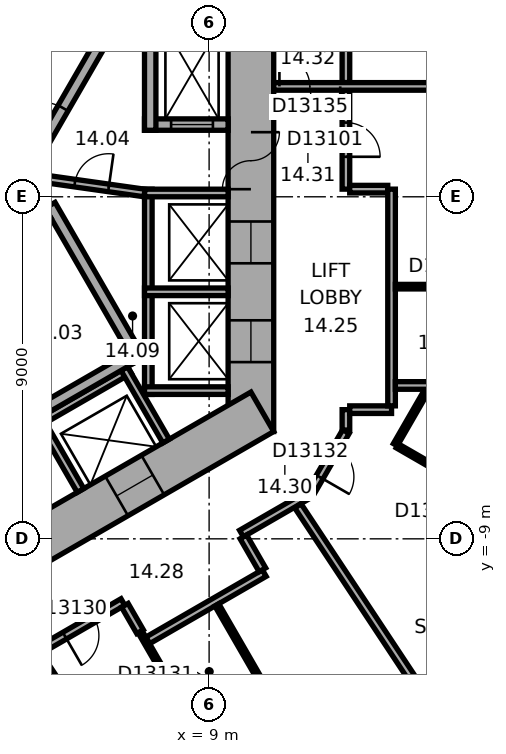
"""IFC4 building model, lengths in metres.
Left out: names, types, materials, properties, quantities, classifications, styles, units other than length and angle.
Written with IfcOpenShell. Run it as: python <this file> out.ifc"""

import sys

from ifc_helpers import new_model, si_unit, direction, frame, frame_2d, origin, place, context, subcontext, project, spatial, rectangle, extrude, element, fill, save


model = new_model("IFC4")
c1 = context("Model", 3, precision=1e-05, world=origin(), true_north=direction((0.0, 1.0)))
c2 = subcontext(c1, "Body", "Model", "MODEL_VIEW")
j1 = project(units=[si_unit("LENGTHUNIT", "METRE"), si_unit("PLANEANGLEUNIT", "RADIAN")], contexts=[c1])
p1 = place(None, origin())
s1 = spatial("IfcSite", under=j1, at=p1, CompositionType="ELEMENT")
p2 = place(p1, origin())
s2 = spatial("IfcBuilding", under=s1, at=p2, CompositionType="ELEMENT")
p3 = place(p2, frame((0.0, 0.0, 67.1)))
s3 = spatial("IfcBuildingStorey", under=s2, at=p3, CompositionType="ELEMENT", Elevation=67.1)
p4 = place(p3, frame((10.1, -6.177, 0.0), z_axis=(0.0, 0.0, 1.0), x_axis=(0.0, 1.0, 0.0)))
e1 = element("IfcWall", 1, at=p4, inside=s3, PredefinedType="SHEAR", context=c2, shape_type="SweptSolid", body=[
    extrude(rectangle(XDim=12.355, YDim=1.2, at=frame_2d((6.177, 0.0))), origin(), (0.0, 0.0, 1.0), 3.3),
])
p5 = place(p4, frame((6.378, 0.0, 0.0)))
e2 = element("IfcOpeningElement", 2, at=p5, cuts=e1, PredefinedType="OPENING", context=c2, shape_type="SweptSolid", body=[
    extrude(rectangle(XDim=1.5, YDim=2.1, at=frame_2d((0.75, 1.05))), frame((0.0, 0.61, 0.0), z_axis=(0.0, -1.0, 0.0), x_axis=(1.0, 0.0, 0.0)), (0.0, 0.0, 1.0), 1.22),
])
p6 = place(p4, frame((1.828, 0.0, 0.0)))
e3 = element("IfcOpeningElement", 3, at=p6, cuts=e1, PredefinedType="OPENING", context=c2, shape_type="SweptSolid", body=[
    extrude(rectangle(XDim=1.1, YDim=2.1, at=frame_2d((0.55, 1.05))), frame((0.0, 0.61, 0.0), z_axis=(0.0, -1.0, 0.0), x_axis=(1.0, 0.0, 0.0)), (0.0, 0.0, 1.0), 1.22),
])
p7 = place(p4, frame((4.427, 0.0, 0.0)))
e4 = element("IfcOpeningElement", 4, at=p7, cuts=e1, PredefinedType="OPENING", context=c2, shape_type="SweptSolid", body=[
    extrude(rectangle(XDim=1.1, YDim=2.1, at=frame_2d((0.55, 1.05))), frame((0.0, 0.61, 0.0), z_axis=(0.0, -1.0, 0.0), x_axis=(1.0, 0.0, 0.0)), (0.0, 0.0, 1.0), 1.22),
])
p8 = place(p3, frame((-0.3, -11.836, 0.0), z_axis=(0.0, 0.0, 1.0), x_axis=(0.866021384402, 0.500006961711, 0.0)))
e5 = element("IfcWall", 5, at=p8, inside=s3, PredefinedType="SHEAR", context=c2, shape_type="SweptSolid", body=[
    extrude(rectangle(XDim=12.355, YDim=1.2, at=frame_2d((6.178, 0.0))), origin(), (0.0, 0.0, 1.0), 3.3),
])
p9 = place(p8, frame((4.128, 0.0, 0.0)))
e6 = element("IfcOpeningElement", 6, at=p9, cuts=e5, PredefinedType="OPENING", context=c2, shape_type="SweptSolid", body=[
    extrude(rectangle(XDim=0.9, YDim=2.1, at=frame_2d((0.45, 1.05))), frame((0.0, 0.61, 0.0), z_axis=(0.0, -1.0, 0.0), x_axis=(1.0, 0.0, 0.0)), (0.0, 0.0, 1.0), 1.22),
])
p10 = place(p8, frame((7.928, 0.0, 0.0)))
e7 = element("IfcOpeningElement", 7, at=p10, cuts=e5, PredefinedType="OPENING", context=c2, shape_type="SweptSolid", body=[
    extrude(rectangle(XDim=1.1, YDim=2.1, at=frame_2d((0.55, 1.05))), frame((0.0, 0.61, 0.0), z_axis=(0.0, -1.0, 0.0), x_axis=(1.0, 0.0, 0.0)), (0.0, 0.0, 1.0), 1.22),
])
p11 = place(p3, frame((7.4, -5.2, 0.0), z_axis=(0.0, 0.0, 1.0), x_axis=(0.0, 1.0, 0.0)))
e8 = element("IfcWall", 8, at=p11, inside=s3, PredefinedType="PARTITIONING", context=c2, shape_type="SweptSolid", body=[
    extrude(rectangle(XDim=5.4, YDim=0.2, at=frame_2d((2.7, 0.0))), origin(), (0.0, 0.0, 1.0), 3.05),
])
for number, where, z_axis, x_axis in (
    (9, (7.3, -5.1, 0.0), (0.0, 0.0, 1.0), (1.0, 0.0, 0.0)),
    (10, (7.3, -2.5, 0.0), (0.0, 0.0, 1.0), (1.0, 0.0, 0.0)),
    (11, (7.3, 0.1, 0.0), (0.0, 0.0, 1.0), (1.0, 0.0, 0.0)),
):
    element("IfcWall", number, at=place(p3, frame(where, z_axis=z_axis, x_axis=x_axis)), inside=s3, PredefinedType="PARTITIONING", context=c2, shape_type="SweptSolid", body=[
        extrude(rectangle(XDim=2.2, YDim=0.2, at=frame_2d((1.1, 0.0))), origin(), (0.0, 0.0, 1.0), 3.05),
    ])
p12 = place(p3, frame((-0.024, -8.559, 0.0), z_axis=(0.0, 0.0, 1.0), x_axis=(0.866026010844, 0.49999894854, 0.0)))
e12 = element("IfcWall", 12, at=p12, inside=s3, PredefinedType="PARTITIONING", context=c2, shape_type="SweptSolid", body=[
    extrude(rectangle(XDim=8.0, YDim=0.2, at=frame_2d((4.0, 0.0))), origin(), (0.0, 0.0, 1.0), 3.05),
])
for number, where, z_axis, x_axis in (
    (13, (4.516, -5.822, 0.0), (0.0, 0.0, 1.0), (0.5, -0.866, 0.0)),
    (14, (6.768, -4.522, 0.0), (0.0, 0.0, 1.0), (0.5, -0.866, 0.0)),
):
    element("IfcWall", number, at=place(p3, frame(where, z_axis=z_axis, x_axis=x_axis)), inside=s3, PredefinedType="PARTITIONING", context=c2, shape_type="SweptSolid", body=[
        extrude(rectangle(XDim=2.2, YDim=0.2, at=frame_2d((1.1, 0.0))), origin(), (0.0, 0.0, 1.0), 3.05),
    ])
p13 = place(p3, frame((4.158, 0.602, 0.0), z_axis=(0.0, 0.0, 1.0), x_axis=(0.499977259774, 0.866038532462, 0.0)))
e15 = element("IfcWall", 15, at=p13, inside=s3, PredefinedType="SHEAR", context=c2, shape_type="SweptSolid", body=[
    extrude(rectangle(XDim=4.7, YDim=0.3, at=frame_2d((2.35, 0.0))), origin(), (0.0, 0.0, 1.0), 3.05),
])
p14 = place(p13, frame((0.8, 0.0, 0.0)))
e16 = element("IfcOpeningElement", 16, at=p14, cuts=e15, PredefinedType="OPENING", context=c2, shape_type="SweptSolid", body=[
    extrude(rectangle(XDim=1.2, YDim=2.1, at=frame_2d((0.6, 1.05))), frame((0.0, 0.16, 0.0), z_axis=(0.0, -1.0, 0.0), x_axis=(1.0, 0.0, 0.0)), (0.0, 0.0, 1.0), 0.32),
])
p15 = place(p3, frame((4.816, -0.222, 0.0), z_axis=(0.0, 0.0, 1.0), x_axis=(0.499977259774, -0.866038532462, 0.0)))
e17 = element("IfcWall", 17, at=p15, inside=s3, PredefinedType="SHEAR", context=c2, shape_type="SweptSolid", body=[
    extrude(rectangle(XDim=4.7, YDim=0.3, at=frame_2d((2.35, 0.0))), origin(), (0.0, 0.0, 1.0), 3.05),
])
p16 = place(p3, frame((0.847, -7.767, 0.0), z_axis=(0.0, 0.0, 1.0), x_axis=(0.866027801685, 0.499995846692, 0.0)))
e18 = element("IfcWall", 18, at=p16, inside=s3, PredefinedType="SHEAR", context=c2, shape_type="SweptSolid", body=[
    extrude(rectangle(XDim=7.06, YDim=0.3, at=frame_2d((3.53, 0.0))), origin(), (0.0, 0.0, 1.0), 3.05),
])
p17 = place(p3, frame((7.3, 1.9, 0.0), z_axis=(0.0, 0.0, 1.0), x_axis=(1.0, 0.0, 0.0)))
e19 = element("IfcWall", 19, at=p17, inside=s3, PredefinedType="SHEAR", context=c2, shape_type="SweptSolid", body=[
    extrude(rectangle(XDim=2.2, YDim=0.3, at=frame_2d((1.1, 0.0))), origin(), (0.0, 0.0, 1.0), 3.05),
])
p18 = place(p17, frame((0.7, 0.0, 0.0)))
e20 = element("IfcOpeningElement", 20, at=p18, cuts=e19, PredefinedType="OPENING", context=c2, shape_type="SweptSolid", body=[
    extrude(rectangle(XDim=1.1, YDim=2.1, at=frame_2d((0.55, 1.05))), frame((0.0, 0.16, 0.0), z_axis=(0.0, -1.0, 0.0), x_axis=(1.0, 0.0, 0.0)), (0.0, 0.0, 1.0), 0.32),
])
p19 = place(p3, frame((7.45, 1.75, 0.0), z_axis=(0.0, 0.0, 1.0), x_axis=(0.0, 1.0, 0.0)))
e21 = element("IfcWall", 21, at=p19, inside=s3, PredefinedType="SHEAR", context=c2, shape_type="SweptSolid", body=[
    extrude(rectangle(XDim=3.35, YDim=0.3, at=frame_2d((1.675, 0.0))), origin(), (0.0, 0.0, 1.0), 3.05),
])
p20 = place(p3, frame((4.327, 0.521, 0.0), z_axis=(0.0, 0.0, 1.0), x_axis=(0.990124376366, -0.14019172346, 0.0)))
e22 = element("IfcWall", 22, at=p20, inside=s3, PredefinedType="PARTITIONING", context=c2, shape_type="SweptSolid", body=[
    extrude(rectangle(XDim=3.002, YDim=0.2, at=frame_2d((1.501, 0.0))), origin(), (0.0, 0.0, 1.0), 3.05),
])
p21 = place(p20, frame((1.15, 0.0, 0.0)))
e23 = element("IfcOpeningElement", 23, at=p21, cuts=e22, PredefinedType="OPENING", context=c2, shape_type="SweptSolid", body=[
    extrude(rectangle(XDim=0.9, YDim=2.1, at=frame_2d((0.45, 1.05))), frame((0.0, 0.11, 0.0), z_axis=(0.0, -1.0, 0.0), x_axis=(1.0, 0.0, 0.0)), (0.0, 0.0, 1.0), 0.22),
])
p22 = place(p3, frame((1.033, -13.953, 0.0), z_axis=(0.0, 0.0, 1.0), x_axis=(0.866017531406, 0.500013635111, 0.0)))
e24 = element("IfcWall", 24, at=p22, inside=s3, PredefinedType="PARTITIONING", context=c2, shape_type="SweptSolid", body=[
    extrude(rectangle(XDim=6.58, YDim=0.2, at=frame_2d((3.29, 0.0))), origin(), (0.0, 0.0, 1.0), 3.05),
])
p23 = place(p22, frame((0.496, 0.0, 0.0)))
e25 = element("IfcOpeningElement", 25, at=p23, cuts=e24, PredefinedType="OPENING", context=c2, shape_type="SweptSolid", body=[
    extrude(rectangle(XDim=0.9, YDim=2.1, at=frame_2d((0.45, 1.05))), frame((0.0, 0.11, 0.0), z_axis=(0.0, -1.0, 0.0), x_axis=(1.0, 0.0, 0.0)), (0.0, 0.0, 1.0), 0.22),
])
p24 = place(p22, frame((4.811, 0.0, 0.0)))
e26 = element("IfcOpeningElement", 26, at=p24, cuts=e24, PredefinedType="OPENING", context=c2, shape_type="SweptSolid", body=[
    extrude(rectangle(XDim=0.9, YDim=2.1, at=frame_2d((0.45, 1.05))), frame((0.0, 0.11, 0.0), z_axis=(0.0, -1.0, 0.0), x_axis=(1.0, 0.0, 0.0)), (0.0, 0.0, 1.0), 0.22),
])
p25 = place(p3, frame((6.782, -10.749, 0.0), z_axis=(0.0, 0.0, 1.0), x_axis=(0.500170954823, -0.865926680471, 0.0)))
e27 = element("IfcWall", 27, at=p25, inside=s3, PredefinedType="PARTITIONING", context=c2, shape_type="SweptSolid", body=[
    extrude(rectangle(XDim=0.801, YDim=0.2, at=frame_2d((0.4, 0.0))), origin(), (0.0, 0.0, 1.0), 3.05),
])
p26 = place(p3, frame((7.385, -11.673, 0.0), z_axis=(0.0, 0.0, 1.0), x_axis=(0.866037524642, 0.499979005472, 0.0)))
e28 = element("IfcWall", 28, at=p26, inside=s3, PredefinedType="PARTITIONING", context=c2, shape_type="SweptSolid", body=[
    extrude(rectangle(XDim=3.542, YDim=0.2, at=frame_2d((1.771, 0.0))), origin(), (0.0, 0.0, 1.0), 3.05),
])
p27 = place(p3, frame((8.833, -14.301, 0.0), z_axis=(0.0, 0.0, 1.0), x_axis=(-0.499936836718, 0.866061868051, 0.0)))
e29 = element("IfcWall", 29, at=p27, inside=s3, PredefinedType="PARTITIONING", context=c2, shape_type="SweptSolid", body=[
    extrude(rectangle(XDim=3.188, YDim=0.12, at=frame_2d((1.594, 0.0))), origin(), (0.0, 0.0, 1.0), 3.05),
])
p28 = place(p27, frame((1.144, 0.0, 0.0)))
e30 = element("IfcOpeningElement", 30, at=p28, cuts=e29, PredefinedType="OPENING", context=c2, shape_type="SweptSolid", body=[
    extrude(rectangle(XDim=0.9, YDim=2.1, at=frame_2d((0.45, 1.05))), frame((0.0, 0.07, 0.0), z_axis=(0.0, -1.0, 0.0), x_axis=(1.0, 0.0, 0.0)), (0.0, 0.0, 1.0), 0.14),
])
p29 = place(p3, frame((9.203, -10.738, 0.0), z_axis=(0.0, 0.0, 1.0), x_axis=(0.50005036918, -0.865996321171, 0.0)))
e31 = element("IfcWall", 31, at=p29, inside=s3, PredefinedType="PARTITIONING", context=c2, shape_type="SweptSolid", body=[
    extrude(rectangle(XDim=2.9, YDim=0.12, at=frame_2d((1.45, 0.0))), origin(), (0.0, 0.0, 1.0), 3.05),
])
p30 = place(p3, frame((9.693, -19.907, 0.0), z_axis=(0.0, 0.0, 1.0), x_axis=(-0.551938394837, 0.833884889121, 0.0)))
e32 = element("IfcWall", 32, at=p30, inside=s3, PredefinedType="PARTITIONING", context=c2, shape_type="SweptSolid", body=[
    extrude(rectangle(XDim=9.394, YDim=0.2, at=frame_2d((4.697, 0.0))), origin(), (0.0, 0.0, 1.0), 2.6),
])
p31 = place(p3, frame((9.852, -8.861, 0.0), z_axis=(0.0, 0.0, 1.0), x_axis=(0.866013291437, 0.500020978615, 0.0)))
e33 = element("IfcWall", 33, at=p31, inside=s3, PredefinedType="PARTITIONING", context=c2, shape_type="SweptSolid", body=[
    extrude(rectangle(XDim=2.077, YDim=0.2, at=frame_2d((1.038, 0.0))), origin(), (0.0, 0.0, 1.0), 3.05),
])
p32 = place(p3, frame((10.402, -9.815, 0.0), z_axis=(0.0, 0.0, 1.0), x_axis=(-0.499968756647, 0.866043441391, 0.0)))
e34 = element("IfcWall", 34, at=p32, inside=s3, PredefinedType="PARTITIONING", context=c2, shape_type="SweptSolid", body=[
    extrude(rectangle(XDim=1.001, YDim=0.2, at=frame_2d((0.5, 0.0))), origin(), (0.0, 0.0, 1.0), 3.05),
])
p33 = place(p3, frame((11.67, -7.788, 0.0), z_axis=(0.0, 0.0, 1.0), x_axis=(0.500063286585, 0.865988862174, 0.0)))
e35 = element("IfcWall", 35, at=p33, inside=s3, PredefinedType="PARTITIONING", context=c2, shape_type="SweptSolid", body=[
    extrude(rectangle(XDim=1.86, YDim=0.2, at=frame_2d((0.93, 0.0))), origin(), (0.0, 0.0, 1.0), 3.05),
])
p34 = place(p33, frame((0.48, 0.0, 0.0)))
e36 = element("IfcOpeningElement", 36, at=p34, cuts=e35, PredefinedType="OPENING", context=c2, shape_type="SweptSolid", body=[
    extrude(rectangle(XDim=0.9, YDim=2.1, at=frame_2d((0.45, 1.05))), frame((0.0, 0.11, 0.0), z_axis=(0.0, -1.0, 0.0), x_axis=(1.0, 0.0, 0.0)), (0.0, 0.0, 1.0), 0.22),
])
p35 = place(p3, frame((12.6, -6.138, 0.0), z_axis=(0.0, 0.0, 1.0), x_axis=(0.0, 1.0, 0.0)))
e37 = element("IfcWall", 37, at=p35, inside=s3, PredefinedType="PARTITIONING", context=c2, shape_type="SweptSolid", body=[
    extrude(rectangle(XDim=0.537, YDim=0.2, at=frame_2d((0.268, 0.0))), origin(), (0.0, 0.0, 1.0), 3.05),
])
p36 = place(p3, frame((12.6, 0.201, 0.0), z_axis=(0.0, 0.0, 1.0), x_axis=(0.0, 1.0, 0.0)))
e38 = element("IfcWall", 38, at=p36, inside=s3, PredefinedType="PARTITIONING", context=c2, shape_type="SweptSolid", body=[
    extrude(rectangle(XDim=2.604, YDim=0.2, at=frame_2d((1.302, 0.0))), origin(), (0.0, 0.0, 1.0), 3.05),
])
p37 = place(p36, frame((0.852, 0.0, 0.0)))
e39 = element("IfcOpeningElement", 39, at=p37, cuts=e38, PredefinedType="OPENING", context=c2, shape_type="SweptSolid", body=[
    extrude(rectangle(XDim=0.9, YDim=2.1, at=frame_2d((0.45, 1.05))), frame((0.0, 0.11, 0.0), z_axis=(0.0, -1.0, 0.0), x_axis=(1.0, 0.0, 0.0)), (0.0, 0.0, 1.0), 0.22),
])
p38 = place(p3, frame((12.6, 3.004, 0.0), z_axis=(0.0, 0.0, 1.0), x_axis=(0.0, 1.0, 0.0)))
e40 = element("IfcWall", 40, at=p38, inside=s3, PredefinedType="PARTITIONING", context=c2, shape_type="SweptSolid", body=[
    extrude(rectangle(XDim=3.173, YDim=0.2, at=frame_2d((1.586, 0.0))), origin(), (0.0, 0.0, 1.0), 3.05),
])
p39 = place(p38, frame((1.136, 0.0, 0.0)))
e41 = element("IfcOpeningElement", 41, at=p39, cuts=e40, PredefinedType="OPENING", context=c2, shape_type="SweptSolid", body=[
    extrude(rectangle(XDim=0.9, YDim=2.1, at=frame_2d((0.45, 1.05))), frame((0.0, 0.11, 0.0), z_axis=(0.0, -1.0, 0.0), x_axis=(1.0, 0.0, 0.0)), (0.0, 0.0, 1.0), 0.22),
])
p40 = place(p3, frame((12.7, -5.601, 0.0), z_axis=(0.0, 0.0, 1.0), x_axis=(1.0, 0.0, 0.0)))
e42 = element("IfcWall", 42, at=p40, inside=s3, PredefinedType="PARTITIONING", context=c2, shape_type="SweptSolid", body=[
    extrude(rectangle(XDim=1.101, YDim=0.2, at=frame_2d((0.551, 0.0))), origin(), (0.0, 0.0, 1.0), 3.05),
])
p41 = place(p3, frame((13.701, 0.201, 0.0), z_axis=(0.0, 0.0, 1.0), x_axis=(-1.0, 0.0, 0.0)))
e43 = element("IfcWall", 43, at=p41, inside=s3, PredefinedType="PARTITIONING", context=c2, shape_type="SweptSolid", body=[
    extrude(rectangle(XDim=1.001, YDim=0.2, at=frame_2d((0.5, 0.0))), origin(), (0.0, 0.0, 1.0), 3.05),
])
p42 = place(p3, frame((13.801, -5.501, 0.0), z_axis=(0.0, 0.0, 1.0), x_axis=(0.0, 1.0, 0.0)))
e44 = element("IfcWall", 44, at=p42, inside=s3, PredefinedType="PARTITIONING", context=c2, shape_type="SweptSolid", body=[
    extrude(rectangle(XDim=5.702, YDim=0.2, at=frame_2d((2.851, 0.0))), origin(), (0.0, 0.0, 1.0), 3.05),
])
p43 = place(p3, frame((13.901, -6.524, 0.0), z_axis=(0.0, 0.0, 1.0), x_axis=(0.499964162598, 0.86604609353, 0.0)))
e45 = element("IfcWall", 45, at=p43, inside=s3, PredefinedType="PARTITIONING", context=c2, shape_type="SweptSolid", body=[
    extrude(rectangle(XDim=1.661, YDim=0.12, at=frame_2d((0.831, 0.0))), origin(), (0.0, 0.0, 1.0), 3.05),
])
p44 = place(p3, frame((13.901, -4.965, 0.0), z_axis=(0.0, 0.0, 1.0), x_axis=(1.0, 0.0, 0.0)))
e46 = element("IfcWall", 46, at=p44, inside=s3, PredefinedType="PARTITIONING", context=c2, shape_type="SweptSolid", body=[
    extrude(rectangle(XDim=8.049, YDim=0.2, at=frame_2d((4.024, 0.0))), origin(), (0.0, 0.0, 1.0), 3.05),
])
p45 = place(p3, frame((13.901, -2.365, 0.0), z_axis=(0.0, 0.0, 1.0), x_axis=(1.0, 0.0, 0.0)))
e47 = element("IfcWall", 47, at=p45, inside=s3, PredefinedType="PARTITIONING", context=c2, shape_type="SweptSolid", body=[
    extrude(rectangle(XDim=2.7, YDim=0.12, at=frame_2d((1.35, 0.0))), origin(), (0.0, 0.0, 1.0), 3.05),
])
p46 = place(p45, frame((0.9, 0.0, 0.0)))
e48 = element("IfcOpeningElement", 48, at=p46, cuts=e47, PredefinedType="OPENING", context=c2, shape_type="SweptSolid", body=[
    extrude(rectangle(XDim=0.9, YDim=2.1, at=frame_2d((0.45, 1.05))), frame((0.0, 0.07, 0.0), z_axis=(0.0, -1.0, 0.0), x_axis=(1.0, 0.0, 0.0)), (0.0, 0.0, 1.0), 0.14),
])
p47 = place(p3, frame((16.255, -15.564, 0.0), z_axis=(0.0, 0.0, 1.0), x_axis=(-0.55192208744, 0.833895682562, 0.0)))
e49 = element("IfcWall", 49, at=p47, inside=s3, PredefinedType="PARTITIONING", context=c2, shape_type="SweptSolid", body=[
    extrude(rectangle(XDim=8.913, YDim=0.2, at=frame_2d((4.457, 0.0))), origin(), (0.0, 0.0, 1.0), 2.6),
])
p48 = place(p3, frame((16.326, -7.925, 0.0), z_axis=(0.0, 0.0, 1.0), x_axis=(-0.865997131366, 0.500048966069, 0.0)))
e50 = element("IfcWall", 50, at=p48, inside=s3, PredefinedType="PARTITIONING", context=c2, shape_type="SweptSolid", body=[
    extrude(rectangle(XDim=2.74, YDim=0.12, at=frame_2d((1.37, 0.0))), origin(), (0.0, 0.0, 1.0), 3.05),
])
p49 = place(p48, frame((0.92, 0.0, 0.0)))
e51 = element("IfcOpeningElement", 51, at=p49, cuts=e50, PredefinedType="OPENING", context=c2, shape_type="SweptSolid", body=[
    extrude(rectangle(XDim=0.9, YDim=2.1, at=frame_2d((0.45, 1.05))), frame((0.0, 0.07, 0.0), z_axis=(0.0, -1.0, 0.0), x_axis=(1.0, 0.0, 0.0)), (0.0, 0.0, 1.0), 0.14),
])
p50 = place(p3, frame((21.95, 2.905, 0.0), z_axis=(0.0, 0.0, 1.0), x_axis=(-1.0, 0.0, 0.0)))
e52 = element("IfcWall", 52, at=p50, inside=s3, PredefinedType="PARTITIONING", context=c2, shape_type="SweptSolid", body=[
    extrude(rectangle(XDim=11.25, YDim=0.2, at=frame_2d((5.625, 0.0))), origin(), (0.0, 0.0, 1.0), 3.05),
])
p51 = place(p50, frame((9.5, 0.0, 0.0)))
e53 = element("IfcOpeningElement", 53, at=p51, cuts=e52, PredefinedType="OPENING", context=c2, shape_type="SweptSolid", body=[
    extrude(rectangle(XDim=1.6, YDim=2.1, at=frame_2d((0.8, 1.05))), frame((0.0, 0.11, 0.0), z_axis=(0.0, -1.0, 0.0), x_axis=(1.0, 0.0, 0.0)), (0.0, 0.0, 1.0), 0.22),
])
p52 = place(p5, origin())
e54 = element("IfcDoor", 54, at=p52, inside=s3, OperationType="DOUBLE_DOOR_SINGLE_SWING", PredefinedType="DOOR", context=c2, shape_type="SweptSolid", body=[
    extrude(rectangle(XDim=1.5, YDim=2.1, at=frame_2d((0.75, 1.05))), frame((0.0, 0.025, 0.0), z_axis=(0.0, -1.0, 0.0), x_axis=(1.0, 0.0, 0.0)), (0.0, 0.0, 1.0), 0.05),
])
fill(e2, e54)
p53 = place(p14, origin())
e55 = element("IfcDoor", 55, at=p53, inside=s3, OperationType="SINGLE_SWING_RIGHT", PredefinedType="DOOR", context=c2, shape_type="SweptSolid", body=[
    extrude(rectangle(XDim=1.2, YDim=2.1, at=frame_2d((0.6, 1.05))), frame((0.0, 0.025, 0.0), z_axis=(0.0, -1.0, 0.0), x_axis=(1.0, 0.0, 0.0)), (0.0, 0.0, 1.0), 0.05),
])
fill(e16, e55)
p54 = place(p21, origin())
e56 = element("IfcDoor", 56, at=p54, inside=s3, OperationType="SINGLE_SWING_LEFT", PredefinedType="DOOR", context=c2, shape_type="SweptSolid", body=[
    extrude(rectangle(XDim=0.9, YDim=2.1, at=frame_2d((0.45, 1.05))), frame((0.0, 0.025, 0.0), z_axis=(0.0, -1.0, 0.0), x_axis=(1.0, 0.0, 0.0)), (0.0, 0.0, 1.0), 0.05),
])
fill(e23, e56)
p55 = place(p18, origin())
e57 = element("IfcDoor", 57, at=p55, inside=s3, OperationType="DOUBLE_DOOR_SLIDING", PredefinedType="DOOR", context=c2, shape_type="SweptSolid", body=[
    extrude(rectangle(XDim=1.1, YDim=2.1, at=frame_2d((0.55, 1.05))), frame((0.0, 0.025, 0.0), z_axis=(0.0, -1.0, 0.0), x_axis=(1.0, 0.0, 0.0)), (0.0, 0.0, 1.0), 0.05),
])
fill(e20, e57)
p56 = place(p6, origin())
e58 = element("IfcDoor", 58, at=p56, inside=s3, OperationType="DOUBLE_DOOR_SLIDING", PredefinedType="DOOR", context=c2, shape_type="SweptSolid", body=[
    extrude(rectangle(XDim=1.1, YDim=2.1, at=frame_2d((0.55, 1.05))), frame((0.0, 0.025, 0.0), z_axis=(0.0, -1.0, 0.0), x_axis=(1.0, 0.0, 0.0)), (0.0, 0.0, 1.0), 0.05),
])
fill(e3, e58)
p57 = place(p7, origin())
e59 = element("IfcDoor", 59, at=p57, inside=s3, OperationType="DOUBLE_DOOR_SLIDING", PredefinedType="DOOR", context=c2, shape_type="SweptSolid", body=[
    extrude(rectangle(XDim=1.1, YDim=2.1, at=frame_2d((0.55, 1.05))), frame((0.0, 0.025, 0.0), z_axis=(0.0, -1.0, 0.0), x_axis=(1.0, 0.0, 0.0)), (0.0, 0.0, 1.0), 0.05),
])
fill(e4, e59)
p58 = place(p10, origin())
e60 = element("IfcDoor", 60, at=p58, inside=s3, OperationType="DOUBLE_DOOR_SLIDING", PredefinedType="DOOR", context=c2, shape_type="SweptSolid", body=[
    extrude(rectangle(XDim=1.1, YDim=2.1, at=frame_2d((0.55, 1.05))), frame((0.0, 0.025, 0.0), z_axis=(0.0, -1.0, 0.0), x_axis=(1.0, 0.0, 0.0)), (0.0, 0.0, 1.0), 0.05),
])
fill(e7, e60)
p59 = place(p37, origin())
e61 = element("IfcDoor", 61, at=p59, inside=s3, OperationType="SINGLE_SWING_LEFT", PredefinedType="DOOR", context=c2, shape_type="SweptSolid", body=[
    extrude(rectangle(XDim=0.9, YDim=2.1, at=frame_2d((0.45, 1.05))), frame((0.0, 0.025, 0.0), z_axis=(0.0, -1.0, 0.0), x_axis=(1.0, 0.0, 0.0)), (0.0, 0.0, 1.0), 0.05),
])
fill(e39, e61)
p60 = place(p24, origin())
e62 = element("IfcDoor", 62, at=p60, inside=s3, OperationType="SINGLE_SWING_LEFT", PredefinedType="DOOR", context=c2, shape_type="SweptSolid", body=[
    extrude(rectangle(XDim=0.9, YDim=2.1, at=frame_2d((0.45, 1.05))), frame((0.0, 0.025, 0.0), z_axis=(0.0, -1.0, 0.0), x_axis=(1.0, 0.0, 0.0)), (0.0, 0.0, 1.0), 0.05),
])
fill(e26, e62)
p61 = place(p28, origin())
e63 = element("IfcDoor", 63, at=p61, inside=s3, OperationType="SINGLE_SWING_LEFT", PredefinedType="DOOR", context=c2, shape_type="SweptSolid", body=[
    extrude(rectangle(XDim=0.9, YDim=2.1, at=frame_2d((0.45, 1.05))), frame((0.0, 0.025, 0.0), z_axis=(0.0, -1.0, 0.0), x_axis=(1.0, 0.0, 0.0)), (0.0, 0.0, 1.0), 0.05),
])
fill(e30, e63)
p62 = place(p34, origin())
e64 = element("IfcDoor", 64, at=p62, inside=s3, OperationType="SINGLE_SWING_LEFT", PredefinedType="DOOR", context=c2, shape_type="SweptSolid", body=[
    extrude(rectangle(XDim=0.9, YDim=2.1, at=frame_2d((0.45, 1.05))), frame((0.0, 0.025, 0.0), z_axis=(0.0, -1.0, 0.0), x_axis=(1.0, 0.0, 0.0)), (0.0, 0.0, 1.0), 0.05),
])
fill(e36, e64)
p63 = place(p51, origin())
e65 = element("IfcDoor", 65, at=p63, inside=s3, OperationType="DOUBLE_DOOR_SINGLE_SWING", PredefinedType="DOOR", context=c2, shape_type="SweptSolid", body=[
    extrude(rectangle(XDim=1.6, YDim=2.1, at=frame_2d((0.8, 1.05))), frame((0.0, 0.025, 0.0), z_axis=(0.0, -1.0, 0.0), x_axis=(1.0, 0.0, 0.0)), (0.0, 0.0, 1.0), 0.05),
])
fill(e53, e65)
save(model, sys.argv[1])
